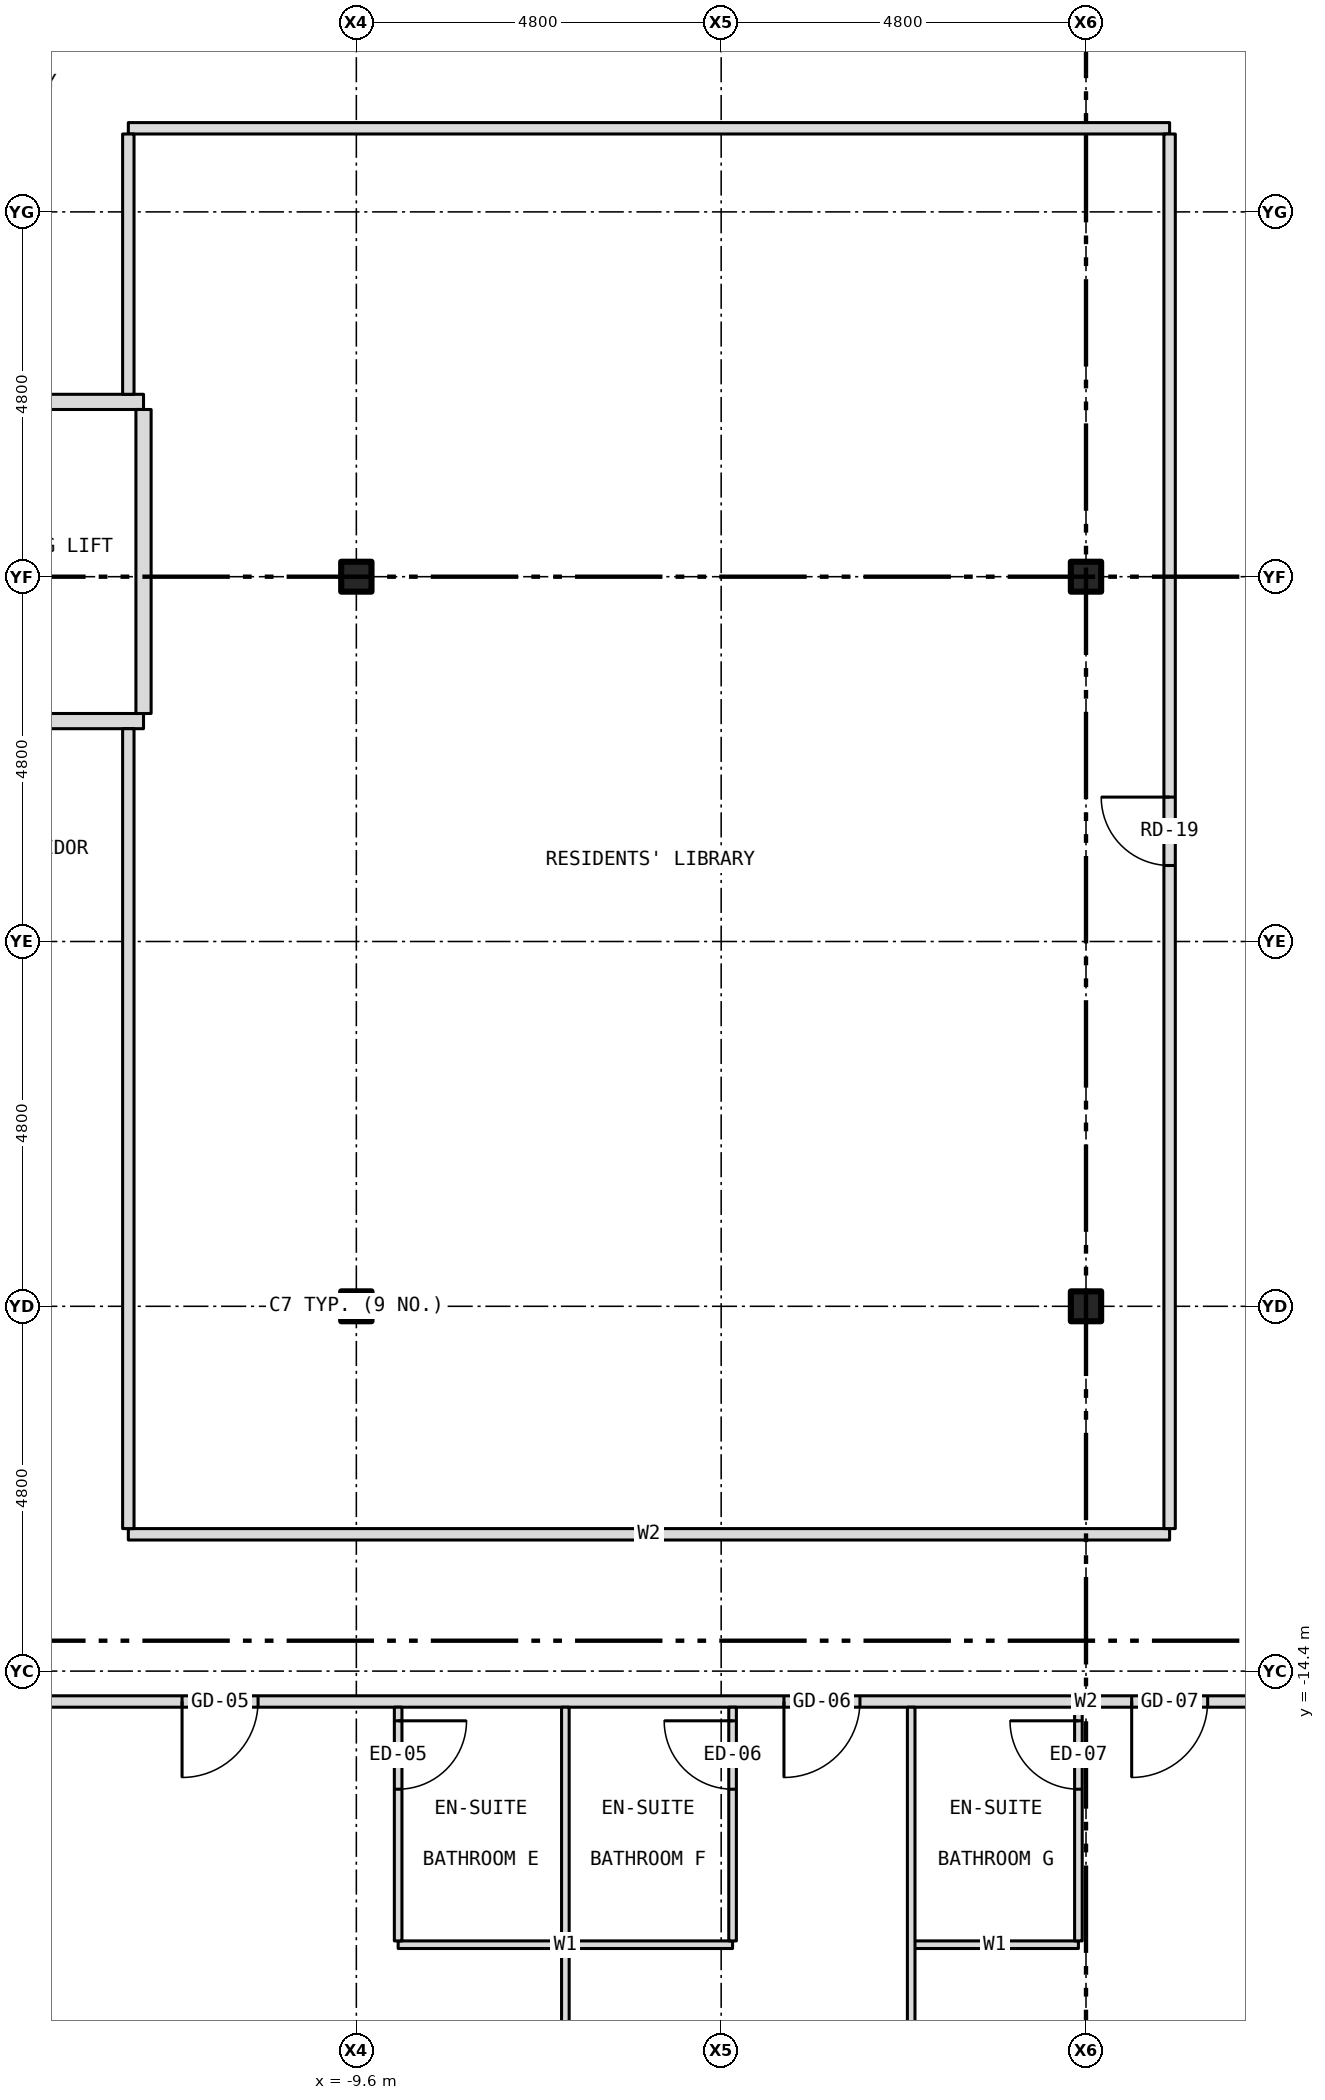
"""IFC4 building model, lengths in metres.
Left out: names, types, materials, properties, quantities, classifications, styles, units other than length and angle.
Written with IfcOpenShell. Run it as: python <this file> out.ifc"""

import sys

from ifc_helpers import new_model, si_unit, direction, frame, frame_2d, origin, origin_2d, place, context, subcontext, project, spatial, rectangle, i_section, extrude, element, fill, save


model = new_model("IFC4")
c1 = context("Model", 3, precision=1e-05, world=origin(), true_north=direction((0.0, 1.0)))
c2 = subcontext(c1, "Body", "Model", "MODEL_VIEW")
j1 = project(units=[si_unit("LENGTHUNIT", "METRE"), si_unit("PLANEANGLEUNIT", "RADIAN")], contexts=[c1])
p1 = place(None, origin())
s1 = spatial("IfcSite", under=j1, at=p1, CompositionType="ELEMENT")
p2 = place(p1, origin())
s2 = spatial("IfcBuilding", under=s1, at=p2, CompositionType="ELEMENT")
p3 = place(p2, frame((0.0, 0.0, 89.0)))
s3 = spatial("IfcBuildingStorey", under=s2, at=p3, CompositionType="ELEMENT", Elevation=89.0)
for number, where, z_axis, x_axis in (
    (1, (-9.6, -9.6, -0.15), (0.0, 0.0, 1.0), (1.0, 0.0, 0.0)),
    (2, (-9.6, 0.0, -0.15), (0.0, 0.0, 1.0), (1.0, 0.0, 0.0)),
    (3, (0.0, -9.6, -0.15), (0.0, 0.0, 1.0), (1.0, 0.0, 0.0)),
    (4, (0.0, 0.0, -0.15), (0.0, 0.0, 1.0), (1.0, 0.0, 0.0)),
):
    element("IfcColumn", number, at=place(p3, frame(where, z_axis=z_axis, x_axis=x_axis)), inside=s3, PredefinedType="COLUMN", context=c2, shape_type="SweptSolid", body=[
        extrude(i_section(OverallWidth=0.399, OverallDepth=0.394, WebThickness=0.023, FlangeThickness=0.037, at=origin_2d()), origin(), (0.0, 0.0, 1.0), 3.5),
    ])
p4 = place(p3, frame((-9.05, -18.0, 0.0), z_axis=(0.0, 0.0, 1.0), x_axis=(1.0, 0.0, 0.0)))
e5 = element("IfcWall", 5, at=p4, inside=s3, PredefinedType="PARTITIONING", context=c2, shape_type="SweptSolid", body=[
    extrude(rectangle(XDim=4.4, YDim=0.1, at=frame_2d((2.2, 0.0))), origin(), (0.0, 0.0, 1.0), 3.35),
])
p5 = place(p3, frame((-2.3, -18.0, 0.0), z_axis=(0.0, 0.0, 1.0), x_axis=(1.0, 0.0, 0.0)))
e6 = element("IfcWall", 6, at=p5, inside=s3, PredefinedType="PARTITIONING", context=c2, shape_type="SweptSolid", body=[
    extrude(rectangle(XDim=2.2, YDim=0.1, at=frame_2d((1.1, 0.0))), origin(), (0.0, 0.0, 1.0), 3.35),
])
p6 = place(p3, frame((-14.8, -14.8, 0.0), z_axis=(0.0, 0.0, 1.0), x_axis=(1.0, 0.0, 0.0)))
e7 = element("IfcWall", 7, at=p6, inside=s3, PredefinedType="PARTITIONING", context=c2, shape_type="SweptSolid", body=[
    extrude(rectangle(XDim=29.6, YDim=0.15, at=frame_2d((14.8, 0.0))), origin(), (0.0, 0.0, 1.0), 3.35),
])
p7 = place(p6, frame((2.907, 0.0, 0.0)))
e8 = element("IfcOpeningElement", 8, at=p7, cuts=e7, PredefinedType="OPENING", context=c2, shape_type="SweptSolid", body=[
    extrude(rectangle(XDim=1.0, YDim=2.1, at=frame_2d((0.5, 1.05))), frame((0.0, 0.087, 0.0), z_axis=(0.0, -1.0, 0.0), x_axis=(1.0, 0.0, 0.0)), (0.0, 0.0, 1.0), 0.174),
])
p8 = place(p6, frame((10.826, 0.0, 0.0)))
e9 = element("IfcOpeningElement", 9, at=p8, cuts=e7, PredefinedType="OPENING", context=c2, shape_type="SweptSolid", body=[
    extrude(rectangle(XDim=1.0, YDim=2.1, at=frame_2d((0.5, 1.05))), frame((0.0, 0.087, 0.0), z_axis=(0.0, -1.0, 0.0), x_axis=(1.0, 0.0, 0.0)), (0.0, 0.0, 1.0), 0.174),
])
p9 = place(p6, frame((15.401, 0.0, 0.0)))
e10 = element("IfcOpeningElement", 10, at=p9, cuts=e7, PredefinedType="OPENING", context=c2, shape_type="SweptSolid", body=[
    extrude(rectangle(XDim=1.0, YDim=2.1, at=frame_2d((0.5, 1.05))), frame((0.0, 0.087, 0.0), z_axis=(0.0, -1.0, 0.0), x_axis=(1.0, 0.0, 0.0)), (0.0, 0.0, 1.0), 0.174),
])
p10 = place(p6, frame((18.919, 0.0, 0.0)))
e11 = element("IfcOpeningElement", 11, at=p10, cuts=e7, PredefinedType="OPENING", context=c2, shape_type="SweptSolid", body=[
    extrude(rectangle(XDim=1.0, YDim=2.1, at=frame_2d((0.5, 1.05))), frame((0.0, 0.087, 0.0), z_axis=(0.0, -1.0, 0.0), x_axis=(1.0, 0.0, 0.0)), (0.0, 0.0, 1.0), 0.174),
])
p11 = place(p6, frame((24.638, 0.0, 0.0)))
e12 = element("IfcOpeningElement", 12, at=p11, cuts=e7, PredefinedType="OPENING", context=c2, shape_type="SweptSolid", body=[
    extrude(rectangle(XDim=1.0, YDim=2.1, at=frame_2d((0.5, 1.05))), frame((0.0, 0.087, 0.0), z_axis=(0.0, -1.0, 0.0), x_axis=(1.0, 0.0, 0.0)), (0.0, 0.0, 1.0), 0.174),
])
p12 = place(p3, frame((-12.6, -12.6, 0.0), z_axis=(0.0, 0.0, 1.0), x_axis=(1.0, 0.0, 0.0)))
e13 = element("IfcWall", 13, at=p12, inside=s3, PredefinedType="PARTITIONING", context=c2, shape_type="SweptSolid", body=[
    extrude(rectangle(XDim=13.7, YDim=0.15, at=frame_2d((6.85, 0.0))), origin(), (0.0, 0.0, 1.0), 3.35),
])
p13 = place(p3, frame((-15.68, -1.9, 0.0), z_axis=(0.0, 0.0, 1.0), x_axis=(1.0, 0.0, 0.0)))
e14 = element("IfcWall", 14, at=p13, inside=s3, PredefinedType="PARTITIONING", context=c2, shape_type="SweptSolid", body=[
    extrude(rectangle(XDim=3.28, YDim=0.2, at=frame_2d((1.64, 0.0))), origin(), (0.0, 0.0, 1.0), 3.35),
])
p14 = place(p13, frame((0.94, 0.0, 0.0)))
e15 = element("IfcOpeningElement", 15, at=p14, cuts=e14, PredefinedType="OPENING", context=c2, shape_type="SweptSolid", body=[
    extrude(rectangle(XDim=1.1, YDim=2.1, at=frame_2d((0.55, 1.05))), frame((0.0, 0.112, 0.0), z_axis=(0.0, -1.0, 0.0), x_axis=(1.0, 0.0, 0.0)), (0.0, 0.0, 1.0), 0.224),
])
p15 = place(p3, frame((-15.68, 2.3, 0.0), z_axis=(0.0, 0.0, 1.0), x_axis=(1.0, 0.0, 0.0)))
e16 = element("IfcWall", 16, at=p15, inside=s3, PredefinedType="PARTITIONING", context=c2, shape_type="SweptSolid", body=[
    extrude(rectangle(XDim=3.28, YDim=0.2, at=frame_2d((1.64, 0.0))), origin(), (0.0, 0.0, 1.0), 3.35),
])
p16 = place(p15, frame((0.84, 0.0, 0.0)))
e17 = element("IfcOpeningElement", 17, at=p16, cuts=e16, PredefinedType="OPENING", context=c2, shape_type="SweptSolid", body=[
    extrude(rectangle(XDim=1.1, YDim=2.1, at=frame_2d((0.55, 1.05))), frame((0.0, 0.112, 0.0), z_axis=(0.0, -1.0, 0.0), x_axis=(1.0, 0.0, 0.0)), (0.0, 0.0, 1.0), 0.224),
])
p17 = place(p3, frame((-12.6, 5.9, 0.0), z_axis=(0.0, 0.0, 1.0), x_axis=(1.0, 0.0, 0.0)))
e18 = element("IfcWall", 18, at=p17, inside=s3, PredefinedType="PARTITIONING", context=c2, shape_type="SweptSolid", body=[
    extrude(rectangle(XDim=13.7, YDim=0.15, at=frame_2d((6.85, 0.0))), origin(), (0.0, 0.0, 1.0), 3.35),
])
p18 = place(p3, frame((-12.6, -12.525, 0.0), z_axis=(0.0, 0.0, 1.0), x_axis=(0.0, 1.0, 0.0)))
e19 = element("IfcWall", 19, at=p18, inside=s3, PredefinedType="PARTITIONING", context=c2, shape_type="SweptSolid", body=[
    extrude(rectangle(XDim=10.525, YDim=0.15, at=frame_2d((5.262, 0.0))), origin(), (0.0, 0.0, 1.0), 3.35),
])
p19 = place(p3, frame((-12.6, 2.4, 0.0), z_axis=(0.0, 0.0, 1.0), x_axis=(0.0, 1.0, 0.0)))
e20 = element("IfcWall", 20, at=p19, inside=s3, PredefinedType="PARTITIONING", context=c2, shape_type="SweptSolid", body=[
    extrude(rectangle(XDim=3.425, YDim=0.15, at=frame_2d((1.712, 0.0))), origin(), (0.0, 0.0, 1.0), 3.35),
])
p20 = place(p3, frame((-12.4, -1.8, 0.0), z_axis=(0.0, 0.0, 1.0), x_axis=(0.0, 1.0, 0.0)))
e21 = element("IfcWall", 21, at=p20, inside=s3, PredefinedType="PARTITIONING", context=c2, shape_type="SweptSolid", body=[
    extrude(rectangle(XDim=4.0, YDim=0.2, at=frame_2d((2.0, 0.0))), origin(), (0.0, 0.0, 1.0), 3.35),
])
p21 = place(p3, frame((-9.05, -17.95, 0.0), z_axis=(0.0, 0.0, 1.0), x_axis=(0.0, 1.0, 0.0)))
e22 = element("IfcWall", 22, at=p21, inside=s3, PredefinedType="PARTITIONING", context=c2, shape_type="SweptSolid", body=[
    extrude(rectangle(XDim=3.075, YDim=0.1, at=frame_2d((1.538, 0.0))), origin(), (0.0, 0.0, 1.0), 3.35),
])
p22 = place(p21, frame((1.996, 0.0, 0.0)))
e23 = element("IfcOpeningElement", 23, at=p22, cuts=e22, PredefinedType="OPENING", context=c2, shape_type="SweptSolid", body=[
    extrude(rectangle(XDim=0.9, YDim=2.1, at=frame_2d((0.45, 1.05))), frame((0.0, 0.062, 0.0), z_axis=(0.0, -1.0, 0.0), x_axis=(1.0, 0.0, 0.0)), (0.0, 0.0, 1.0), 0.124),
])
p23 = place(p3, frame((-6.85, -23.28, 0.0), z_axis=(0.0, 0.0, 1.0), x_axis=(0.0, 1.0, 0.0)))
e24 = element("IfcWall", 24, at=p23, inside=s3, PredefinedType="PARTITIONING", context=c2, shape_type="SweptSolid", body=[
    extrude(rectangle(XDim=5.23, YDim=0.1, at=frame_2d((2.615, 0.0))), origin(), (0.0, 0.0, 1.0), 3.35),
])
p24 = place(p3, frame((-6.85, -17.95, 0.0), z_axis=(0.0, 0.0, 1.0), x_axis=(0.0, 1.0, 0.0)))
e25 = element("IfcWall", 25, at=p24, inside=s3, PredefinedType="PARTITIONING", context=c2, shape_type="SweptSolid", body=[
    extrude(rectangle(XDim=3.075, YDim=0.1, at=frame_2d((1.538, 0.0))), origin(), (0.0, 0.0, 1.0), 3.35),
])
p25 = place(p3, frame((-4.65, -17.95, 0.0), z_axis=(0.0, 0.0, 1.0), x_axis=(0.0, 1.0, 0.0)))
e26 = element("IfcWall", 26, at=p25, inside=s3, PredefinedType="PARTITIONING", context=c2, shape_type="SweptSolid", body=[
    extrude(rectangle(XDim=3.075, YDim=0.1, at=frame_2d((1.538, 0.0))), origin(), (0.0, 0.0, 1.0), 2.817),
])
p26 = place(p25, frame((1.996, 0.0, 0.0)))
e27 = element("IfcOpeningElement", 27, at=p26, cuts=e26, PredefinedType="OPENING", context=c2, shape_type="SweptSolid", body=[
    extrude(rectangle(XDim=0.9, YDim=2.1, at=frame_2d((0.45, 1.05))), frame((0.0, 0.062, 0.0), z_axis=(0.0, -1.0, 0.0), x_axis=(1.0, 0.0, 0.0)), (0.0, 0.0, 1.0), 0.124),
])
p27 = place(p3, frame((-2.3, -23.28, 0.0), z_axis=(0.0, 0.0, 1.0), x_axis=(0.0, 1.0, 0.0)))
e28 = element("IfcWall", 28, at=p27, inside=s3, PredefinedType="PARTITIONING", context=c2, shape_type="SweptSolid", body=[
    extrude(rectangle(XDim=8.405, YDim=0.1, at=frame_2d((4.203, 0.0))), origin(), (0.0, 0.0, 1.0), 3.35),
])
p28 = place(p3, frame((-0.1, -17.95, 0.0), z_axis=(0.0, 0.0, 1.0), x_axis=(0.0, 1.0, 0.0)))
e29 = element("IfcWall", 29, at=p28, inside=s3, PredefinedType="PARTITIONING", context=c2, shape_type="SweptSolid", body=[
    extrude(rectangle(XDim=3.075, YDim=0.1, at=frame_2d((1.538, 0.0))), origin(), (0.0, 0.0, 1.0), 2.728),
])
p29 = place(p28, frame((1.996, 0.0, 0.0)))
e30 = element("IfcOpeningElement", 30, at=p29, cuts=e29, PredefinedType="OPENING", context=c2, shape_type="SweptSolid", body=[
    extrude(rectangle(XDim=0.9, YDim=2.1, at=frame_2d((0.45, 1.05))), frame((0.0, 0.062, 0.0), z_axis=(0.0, -1.0, 0.0), x_axis=(1.0, 0.0, 0.0)), (0.0, 0.0, 1.0), 0.124),
])
p30 = place(p3, frame((1.1, -12.525, 0.0), z_axis=(0.0, 0.0, 1.0), x_axis=(0.0, 1.0, 0.0)))
e31 = element("IfcWall", 31, at=p30, inside=s3, PredefinedType="PARTITIONING", context=c2, shape_type="SweptSolid", body=[
    extrude(rectangle(XDim=18.35, YDim=0.15, at=frame_2d((9.175, 0.0))), origin(), (0.0, 0.0, 1.0), 3.35),
])
p31 = place(p30, frame((8.725, 0.0, 0.0)))
e32 = element("IfcOpeningElement", 32, at=p31, cuts=e31, PredefinedType="OPENING", context=c2, shape_type="SweptSolid", body=[
    extrude(rectangle(XDim=0.9, YDim=2.1, at=frame_2d((0.45, 1.05))), frame((0.0, 0.087, 0.0), z_axis=(0.0, -1.0, 0.0), x_axis=(1.0, 0.0, 0.0)), (0.0, 0.0, 1.0), 0.174),
])
p32 = place(p7, origin())
e33 = element("IfcDoor", 33, at=p32, inside=s3, OperationType="SINGLE_SWING_LEFT", PredefinedType="DOOR", context=c2, shape_type="SweptSolid", body=[
    extrude(rectangle(XDim=1.0, YDim=2.1, at=frame_2d((0.5, 1.05))), frame((0.0, 0.025, 0.0), z_axis=(0.0, -1.0, 0.0), x_axis=(1.0, 0.0, 0.0)), (0.0, 0.0, 1.0), 0.05),
])
fill(e8, e33)
p33 = place(p22, origin())
e34 = element("IfcDoor", 34, at=p33, inside=s3, OperationType="SINGLE_SWING_RIGHT", PredefinedType="DOOR", context=c2, shape_type="SweptSolid", body=[
    extrude(rectangle(XDim=0.9, YDim=2.1, at=frame_2d((0.45, 1.05))), frame((0.0, 0.025, 0.0), z_axis=(0.0, -1.0, 0.0), x_axis=(1.0, 0.0, 0.0)), (0.0, 0.0, 1.0), 0.05),
])
fill(e23, e34)
p34 = place(p8, origin())
e35 = element("IfcDoor", 35, at=p34, inside=s3, OperationType="SINGLE_SWING_LEFT", PredefinedType="DOOR", context=c2, shape_type="SweptSolid", body=[
    extrude(rectangle(XDim=1.0, YDim=2.1, at=frame_2d((0.5, 1.05))), frame((0.0, 0.025, 0.0), z_axis=(0.0, -1.0, 0.0), x_axis=(1.0, 0.0, 0.0)), (0.0, 0.0, 1.0), 0.05),
])
fill(e9, e35)
p35 = place(p26, origin())
e36 = element("IfcDoor", 36, at=p35, inside=s3, OperationType="SINGLE_SWING_RIGHT", PredefinedType="DOOR", context=c2, shape_type="SweptSolid", body=[
    extrude(rectangle(XDim=0.9, YDim=2.1, at=frame_2d((0.45, 1.05))), frame((0.0, 0.025, 0.0), z_axis=(0.0, -1.0, 0.0), x_axis=(1.0, 0.0, 0.0)), (0.0, 0.0, 1.0), 0.05),
])
fill(e27, e36)
p36 = place(p9, origin())
e37 = element("IfcDoor", 37, at=p36, inside=s3, OperationType="SINGLE_SWING_LEFT", PredefinedType="DOOR", context=c2, shape_type="SweptSolid", body=[
    extrude(rectangle(XDim=1.0, YDim=2.1, at=frame_2d((0.5, 1.05))), frame((0.0, 0.025, 0.0), z_axis=(0.0, -1.0, 0.0), x_axis=(1.0, 0.0, 0.0)), (0.0, 0.0, 1.0), 0.05),
])
fill(e10, e37)
p37 = place(p29, origin())
e38 = element("IfcDoor", 38, at=p37, inside=s3, OperationType="SINGLE_SWING_RIGHT", PredefinedType="DOOR", context=c2, shape_type="SweptSolid", body=[
    extrude(rectangle(XDim=0.9, YDim=2.1, at=frame_2d((0.45, 1.05))), frame((0.0, 0.025, 0.0), z_axis=(0.0, -1.0, 0.0), x_axis=(1.0, 0.0, 0.0)), (0.0, 0.0, 1.0), 0.05),
])
fill(e30, e38)
p38 = place(p31, origin())
e39 = element("IfcDoor", 39, at=p38, inside=s3, OperationType="SINGLE_SWING_RIGHT", PredefinedType="DOOR", context=c2, shape_type="SweptSolid", body=[
    extrude(rectangle(XDim=0.9, YDim=2.1, at=frame_2d((0.45, 1.05))), frame((0.0, 0.025, 0.0), z_axis=(0.0, -1.0, 0.0), x_axis=(1.0, 0.0, 0.0)), (0.0, 0.0, 1.0), 0.05),
])
fill(e32, e39)
save(model, sys.argv[1])
